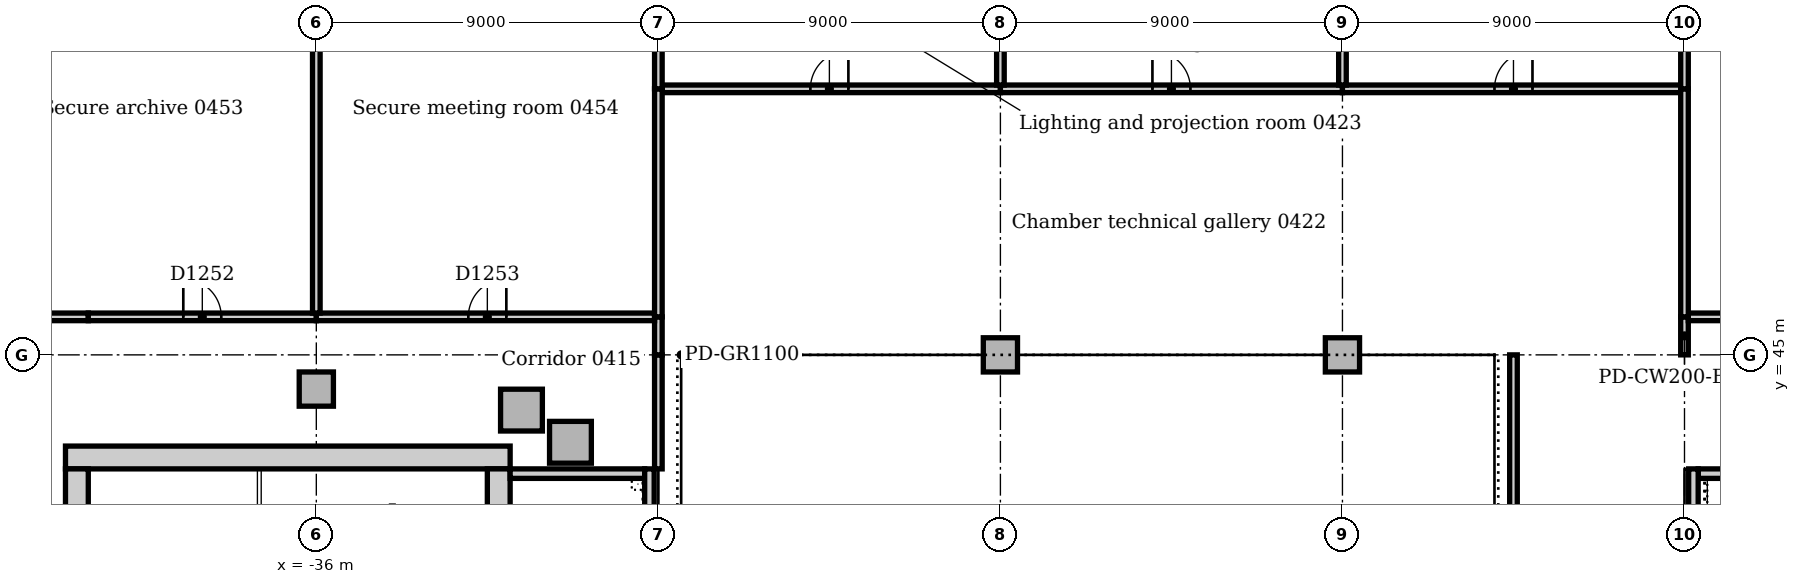
"""IFC4 building model, lengths in metres.
Left out: names, types, materials, properties, quantities, classifications, styles, units other than length and angle.
Written with IfcOpenShell. Run it as: python <this file> out.ifc"""

import sys

from ifc_helpers import new_model, si_unit, direction, frame, frame_2d, origin, origin_2d, place, context, subcontext, project, spatial, rectangle, extrude, element, fill, save


model = new_model("IFC4")
c1 = context("Model", 3, precision=1e-05, world=origin(), true_north=direction((0.0, 1.0)))
c2 = subcontext(c1, "Body", "Model", "MODEL_VIEW")
j1 = project(units=[si_unit("LENGTHUNIT", "METRE"), si_unit("PLANEANGLEUNIT", "RADIAN")], contexts=[c1])
p1 = place(None, origin())
s1 = spatial("IfcSite", under=j1, at=p1, CompositionType="ELEMENT")
p2 = place(p1, origin())
s2 = spatial("IfcBuilding", under=s1, at=p2, CompositionType="ELEMENT")
p3 = place(p2, frame((0.0, 0.0, 21.0)))
s3 = spatial("IfcBuildingStorey", under=s2, at=p3, CompositionType="ELEMENT", Elevation=21.0)
p4 = place(p3, frame((3.9, 41.875, 0.0), z_axis=(0.0, 0.0, 1.0), x_axis=(-1.0, 0.0, 0.0)))
e1 = element("IfcWall", 1, at=p4, inside=s3, PredefinedType="SOLIDWALL", context=c2, shape_type="SweptSolid", body=[
    extrude(rectangle(XDim=3.54, YDim=0.25, at=frame_2d((1.77, 0.0))), origin(), (0.0, 0.0, 1.0), 5.0),
])
p5 = place(p3, frame((0.235, 21.0, 0.0), z_axis=(0.0, 0.0, 1.0), x_axis=(0.0, 1.0, 0.0)))
e2 = element("IfcWall", 2, at=p5, inside=s3, PredefinedType="SOLIDWALL", context=c2, shape_type="SweptSolid", body=[
    extrude(rectangle(XDim=21.0, YDim=0.25, at=frame_2d((10.5, 0.0))), origin(), (0.0, 0.0, 1.0), 5.0),
])
p6 = place(p3, frame((-30.9, 42.3, 0.0), z_axis=(0.0, 0.0, 1.0), x_axis=(-1.0, 0.0, 0.0)))
e3 = element("IfcWall", 3, at=p6, inside=s3, PredefinedType="SOLIDWALL", context=c2, shape_type="SweptSolid", body=[
    extrude(rectangle(XDim=11.7, YDim=0.6, at=frame_2d((5.85, 0.0))), origin(), (0.0, 0.0, 1.0), 5.0),
])
p7 = place(p3, frame((-31.2, 30.5, 0.0), z_axis=(0.0, 0.0, 1.0), x_axis=(0.0, 1.0, 0.0)))
e4 = element("IfcWall", 4, at=p7, inside=s3, PredefinedType="SOLIDWALL", context=c2, shape_type="SweptSolid", body=[
    extrude(rectangle(XDim=11.5, YDim=0.6, at=frame_2d((5.75, 0.0))), origin(), (0.0, 0.0, 1.0), 5.0),
])
p8 = place(p7, frame((0.85, 0.0, 0.0)))
e5 = element("IfcOpeningElement", 5, at=p8, cuts=e4, PredefinedType="OPENING", context=c2, shape_type="SweptSolid", body=[
    extrude(rectangle(XDim=1.8, YDim=2.1, at=frame_2d((0.9, 1.05))), frame((0.0, 0.31, 0.0), z_axis=(0.0, -1.0, 0.0), x_axis=(1.0, 0.0, 0.0)), (0.0, 0.0, 1.0), 0.62),
])
p9 = place(p3, frame((-42.3, 42.0, 0.0), z_axis=(0.0, 0.0, 1.0), x_axis=(0.0, -1.0, 0.0)))
e6 = element("IfcWall", 6, at=p9, inside=s3, PredefinedType="SOLIDWALL", context=c2, shape_type="SweptSolid", body=[
    extrude(rectangle(XDim=11.5, YDim=0.6, at=frame_2d((5.75, 0.0))), origin(), (0.0, 0.0, 1.0), 5.0),
])
p10 = place(p9, frame((8.85, 0.0, 0.0)))
e7 = element("IfcOpeningElement", 7, at=p10, cuts=e6, PredefinedType="OPENING", context=c2, shape_type="SweptSolid", body=[
    extrude(rectangle(XDim=1.8, YDim=2.1, at=frame_2d((0.9, 1.05))), frame((0.0, 0.31, 0.0), z_axis=(0.0, -1.0, 0.0), x_axis=(1.0, 0.0, 0.0)), (0.0, 0.0, 1.0), 0.62),
])
p11 = place(p3, frame((-27.36, 41.875, 0.0), z_axis=(0.0, 0.0, 1.0), x_axis=(-1.0, 0.0, 0.0)))
e8 = element("IfcWall", 8, at=p11, inside=s3, PredefinedType="SOLIDWALL", context=c2, shape_type="SweptSolid", body=[
    extrude(rectangle(XDim=3.54, YDim=0.25, at=frame_2d((1.77, 0.0))), origin(), (0.0, 0.0, 1.0), 5.0),
])
p12 = place(p3, frame((-27.235, 35.35, 0.0), z_axis=(0.0, 0.0, 1.0), x_axis=(0.0, 1.0, 0.0)))
e9 = element("IfcWall", 9, at=p12, inside=s3, PredefinedType="SOLIDWALL", context=c2, shape_type="SweptSolid", body=[
    extrude(rectangle(XDim=6.65, YDim=0.25, at=frame_2d((3.325, 0.0))), origin(), (0.0, 0.0, 1.0), 5.0),
])
for number, where, z_axis, x_axis in (
    (10, (-29.313, 42.7, 0.0), (0.0, 0.0, 1.0), (1.0, 0.0, 0.0)),
    (11, (-30.602, 43.547, 0.0), (0.0, 0.0, 1.0), (1.0, 0.0, 0.0)),
):
    element("IfcColumn", number, at=place(p3, frame(where, z_axis=z_axis, x_axis=x_axis)), inside=s3, PredefinedType="COLUMN", context=c2, shape_type="SweptSolid", body=[
        extrude(rectangle(XDim=1.1, YDim=1.1, at=origin_2d()), origin(), (0.0, 0.0, 1.0), 4.85),
    ])
p13 = place(p3, frame((-36.0, 44.1, 0.0), z_axis=(0.0, 0.0, 1.0), x_axis=(1.0, 0.0, 0.0)))
e12 = element("IfcColumn", 12, at=p13, inside=s3, PredefinedType="COLUMN", context=c2, shape_type="SweptSolid", body=[
    extrude(rectangle(XDim=0.9, YDim=0.9, at=origin_2d()), origin(), (0.0, 0.0, 1.0), 4.85),
])
for number, where, z_axis, x_axis in (
    (13, (-18.0, 45.0, 0.0), (0.0, 0.0, 1.0), (1.0, 0.0, 0.0)),
    (14, (-9.0, 45.0, 0.0), (0.0, 0.0, 1.0), (1.0, 0.0, 0.0)),
):
    element("IfcColumn", number, at=place(p3, frame(where, z_axis=z_axis, x_axis=x_axis)), inside=s3, PredefinedType="COLUMN", context=c2, shape_type="SweptSolid", body=[
        extrude(rectangle(XDim=0.9, YDim=0.9, at=origin_2d()), origin(), (0.0, 0.0, 1.0), 4.7),
    ])
p14 = place(p3, frame((-44.9, 46.0, 0.0), z_axis=(0.0, 0.0, 1.0), x_axis=(1.0, 0.0, 0.0)))
e15 = element("IfcWall", 15, at=p14, inside=s3, PredefinedType="PARTITIONING", context=c2, shape_type="SweptSolid", body=[
    extrude(rectangle(XDim=2.9, YDim=0.2, at=frame_2d((1.45, 0.0))), origin(), (0.0, 0.0, 1.0), 4.7),
])
p15 = place(p3, frame((-27.0, 42.0, 0.0), z_axis=(0.0, 0.0, 1.0), x_axis=(0.0, 1.0, 0.0)))
e16 = element("IfcWall", 16, at=p15, inside=s3, PredefinedType="PARTITIONING", context=c2, shape_type="SweptSolid", body=[
    extrude(rectangle(XDim=3.0, YDim=0.2, at=frame_2d((1.5, 0.0))), origin(), (0.0, 0.0, 1.0), 4.7),
])
p16 = place(p3, frame((-27.0, 45.0, 0.0), z_axis=(0.0, 0.0, 1.0), x_axis=(0.0, 1.0, 0.0)))
e17 = element("IfcWall", 17, at=p16, inside=s3, PredefinedType="PARTITIONING", context=c2, shape_type="SweptSolid", body=[
    extrude(rectangle(XDim=1.0, YDim=0.2, at=frame_2d((0.5, 0.0))), origin(), (0.0, 0.0, 1.0), 4.7),
])
p17 = place(p3, frame((-42.0, 46.0, 0.0), z_axis=(0.0, 0.0, 1.0), x_axis=(1.0, 0.0, 0.0)))
e18 = element("IfcWall", 18, at=p17, inside=s3, PredefinedType="PARTITIONING", context=c2, shape_type="SweptSolid", body=[
    extrude(rectangle(XDim=6.0, YDim=0.2, at=frame_2d((3.0, 0.0))), origin(), (0.0, 0.0, 1.0), 4.7),
])
p18 = place(p17, frame((2.5, 0.0, 0.0)))
e19 = element("IfcOpeningElement", 19, at=p18, cuts=e18, PredefinedType="OPENING", context=c2, shape_type="SweptSolid", body=[
    extrude(rectangle(XDim=1.0, YDim=2.1, at=frame_2d((0.5, 1.05))), frame((0.0, 0.11, 0.0), z_axis=(0.0, -1.0, 0.0), x_axis=(1.0, 0.0, 0.0)), (0.0, 0.0, 1.0), 0.22),
])
p19 = place(p3, frame((-36.0, 46.0, 0.0), z_axis=(0.0, 0.0, 1.0), x_axis=(1.0, 0.0, 0.0)))
e20 = element("IfcWall", 20, at=p19, inside=s3, PredefinedType="PARTITIONING", context=c2, shape_type="SweptSolid", body=[
    extrude(rectangle(XDim=8.9, YDim=0.2, at=frame_2d((4.45, 0.0))), origin(), (0.0, 0.0, 1.0), 4.7),
])
p20 = place(p19, frame((4.0, 0.0, 0.0)))
e21 = element("IfcOpeningElement", 21, at=p20, cuts=e20, PredefinedType="OPENING", context=c2, shape_type="SweptSolid", body=[
    extrude(rectangle(XDim=1.0, YDim=2.1, at=frame_2d((0.5, 1.05))), frame((0.0, 0.11, 0.0), z_axis=(0.0, -1.0, 0.0), x_axis=(1.0, 0.0, 0.0)), (0.0, 0.0, 1.0), 0.22),
])
p21 = place(p3, frame((0.0, 45.0, 0.0), z_axis=(0.0, 0.0, 1.0), x_axis=(0.0, 1.0, 0.0)))
e22 = element("IfcWall", 22, at=p21, inside=s3, PredefinedType="PARTITIONING", context=c2, shape_type="SweptSolid", body=[
    extrude(rectangle(XDim=1.0, YDim=0.2, at=frame_2d((0.5, 0.0))), origin(), (0.0, 0.0, 1.0), 4.7),
])
p22 = place(p3, frame((0.1, 46.0, 0.0), z_axis=(0.0, 0.0, 1.0), x_axis=(1.0, 0.0, 0.0)))
e23 = element("IfcWall", 23, at=p22, inside=s3, PredefinedType="PARTITIONING", context=c2, shape_type="SweptSolid", body=[
    extrude(rectangle(XDim=8.9, YDim=0.2, at=frame_2d((4.45, 0.0))), origin(), (0.0, 0.0, 1.0), 4.7),
])
p23 = place(p22, frame((3.9, 0.0, 0.0)))
e24 = element("IfcOpeningElement", 24, at=p23, cuts=e23, PredefinedType="OPENING", context=c2, shape_type="SweptSolid", body=[
    extrude(rectangle(XDim=1.0, YDim=2.1, at=frame_2d((0.5, 1.05))), frame((0.0, 0.11, 0.0), z_axis=(0.0, -1.0, 0.0), x_axis=(1.0, 0.0, 0.0)), (0.0, 0.0, 1.0), 0.22),
])
p24 = place(p3, frame((-4.5, 21.0, 0.0), z_axis=(0.0, 0.0, 1.0), x_axis=(0.0, 1.0, 0.0)))
e25 = element("IfcWall", 25, at=p24, inside=s3, PredefinedType="PARTITIONING", context=c2, shape_type="SweptSolid", body=[
    extrude(rectangle(XDim=24.0, YDim=0.2, at=frame_2d((12.0, 0.0))), origin(), (0.0, 0.0, 1.0), 4.7),
])
p25 = place(p3, frame((-26.9, 52.0, 0.0), z_axis=(0.0, 0.0, 1.0), x_axis=(1.0, 0.0, 0.0)))
e26 = element("IfcWall", 26, at=p25, inside=s3, PredefinedType="PARTITIONING", context=c2, shape_type="SweptSolid", body=[
    extrude(rectangle(XDim=8.9, YDim=0.2, at=frame_2d((4.45, 0.0))), origin(), (0.0, 0.0, 1.0), 4.7),
])
p26 = place(p25, frame((3.9, 0.0, 0.0)))
e27 = element("IfcOpeningElement", 27, at=p26, cuts=e26, PredefinedType="OPENING", context=c2, shape_type="SweptSolid", body=[
    extrude(rectangle(XDim=1.0, YDim=2.1, at=frame_2d((0.5, 1.05))), frame((0.0, 0.11, 0.0), z_axis=(0.0, -1.0, 0.0), x_axis=(1.0, 0.0, 0.0)), (0.0, 0.0, 1.0), 0.22),
])
p27 = place(p3, frame((-18.0, 52.0, 0.0), z_axis=(0.0, 0.0, 1.0), x_axis=(1.0, 0.0, 0.0)))
e28 = element("IfcWall", 28, at=p27, inside=s3, PredefinedType="PARTITIONING", context=c2, shape_type="SweptSolid", body=[
    extrude(rectangle(XDim=9.0, YDim=0.2, at=frame_2d((4.5, 0.0))), origin(), (0.0, 0.0, 1.0), 4.7),
])
p28 = place(p27, frame((4.0, 0.0, 0.0)))
e29 = element("IfcOpeningElement", 29, at=p28, cuts=e28, PredefinedType="OPENING", context=c2, shape_type="SweptSolid", body=[
    extrude(rectangle(XDim=1.0, YDim=2.1, at=frame_2d((0.5, 1.05))), frame((0.0, 0.11, 0.0), z_axis=(0.0, -1.0, 0.0), x_axis=(1.0, 0.0, 0.0)), (0.0, 0.0, 1.0), 0.22),
])
p29 = place(p3, frame((-9.0, 52.0, 0.0), z_axis=(0.0, 0.0, 1.0), x_axis=(1.0, 0.0, 0.0)))
e30 = element("IfcWall", 30, at=p29, inside=s3, PredefinedType="PARTITIONING", context=c2, shape_type="SweptSolid", body=[
    extrude(rectangle(XDim=8.9, YDim=0.2, at=frame_2d((4.45, 0.0))), origin(), (0.0, 0.0, 1.0), 4.7),
])
p30 = place(p29, frame((4.0, 0.0, 0.0)))
e31 = element("IfcOpeningElement", 31, at=p30, cuts=e30, PredefinedType="OPENING", context=c2, shape_type="SweptSolid", body=[
    extrude(rectangle(XDim=1.0, YDim=2.1, at=frame_2d((0.5, 1.05))), frame((0.0, 0.11, 0.0), z_axis=(0.0, -1.0, 0.0), x_axis=(1.0, 0.0, 0.0)), (0.0, 0.0, 1.0), 0.22),
])
for number, where, z_axis, x_axis in (
    (32, (-27.0, 46.0, 0.0), (0.0, 0.0, 1.0), (0.0, 1.0, 0.0)),
    (33, (0.0, 46.0, 0.0), (0.0, 0.0, 1.0), (0.0, 1.0, 0.0)),
):
    element("IfcWall", number, at=place(p3, frame(where, z_axis=z_axis, x_axis=x_axis)), inside=s3, PredefinedType="PARTITIONING", context=c2, shape_type="SweptSolid", body=[
        extrude(rectangle(XDim=6.0, YDim=0.2, at=frame_2d((3.0, 0.0))), origin(), (0.0, 0.0, 1.0), 4.7),
    ])
p31 = place(p3, frame((-18.0, 52.1, 0.0), z_axis=(0.0, 0.0, 1.0), x_axis=(0.0, 1.0, 0.0)))
e34 = element("IfcWall", 34, at=p31, inside=s3, PredefinedType="PARTITIONING", context=c2, shape_type="SweptSolid", body=[
    extrude(rectangle(XDim=1.43, YDim=0.2, at=frame_2d((0.715, 0.0))), origin(), (0.0, 0.0, 1.0), 4.7),
])
p32 = place(p3, frame((-27.0, 52.0, 0.0), z_axis=(0.0, 0.0, 1.0), x_axis=(0.0, 1.0, 0.0)))
e35 = element("IfcWall", 35, at=p32, inside=s3, PredefinedType="PARTITIONING", context=c2, shape_type="SweptSolid", body=[
    extrude(rectangle(XDim=1.53, YDim=0.2, at=frame_2d((0.765, 0.0))), origin(), (0.0, 0.0, 1.0), 4.7),
])
p33 = place(p3, frame((-9.0, 52.1, 0.0), z_axis=(0.0, 0.0, 1.0), x_axis=(0.0, 1.0, 0.0)))
e36 = element("IfcWall", 36, at=p33, inside=s3, PredefinedType="PARTITIONING", context=c2, shape_type="SweptSolid", body=[
    extrude(rectangle(XDim=1.43, YDim=0.2, at=frame_2d((0.715, 0.0))), origin(), (0.0, 0.0, 1.0), 4.7),
])
p34 = place(p3, frame((0.0, 52.0, 0.0), z_axis=(0.0, 0.0, 1.0), x_axis=(0.0, 1.0, 0.0)))
e37 = element("IfcWall", 37, at=p34, inside=s3, PredefinedType="PARTITIONING", context=c2, shape_type="SweptSolid", body=[
    extrude(rectangle(XDim=1.53, YDim=0.2, at=frame_2d((0.765, 0.0))), origin(), (0.0, 0.0, 1.0), 4.7),
])
p35 = place(p3, frame((-36.0, 46.1, 0.0), z_axis=(0.0, 0.0, 1.0), x_axis=(0.0, 1.0, 0.0)))
e38 = element("IfcWall", 38, at=p35, inside=s3, PredefinedType="PARTITIONING", context=c2, shape_type="SweptSolid", body=[
    extrude(rectangle(XDim=7.43, YDim=0.2, at=frame_2d((3.715, 0.0))), origin(), (0.0, 0.0, 1.0), 4.7),
])
p36 = place(p3, frame((0.48, 39.795, 0.0), z_axis=(0.0, 0.0, 1.0), x_axis=(0.0, 1.0, 0.0)))
e39 = element("IfcWall", 39, at=p36, inside=s3, PredefinedType="STANDARD", context=c2, shape_type="SweptSolid", body=[
    extrude(rectangle(XDim=1.955, YDim=0.24, at=frame_2d((0.978, 0.0))), origin(), (0.0, 0.0, 1.0), 5.0),
])
p37 = place(p3, frame((-34.0, 41.075, 0.0), z_axis=(0.0, 0.0, 1.0), x_axis=(0.0, -1.0, 0.0)))
e40 = element("IfcWall", 40, at=p37, inside=s3, PredefinedType="SOLIDWALL", context=c2, shape_type="SweptSolid", body=[
    extrude(rectangle(XDim=7.0, YDim=0.15, at=frame_2d((3.5, 0.0))), origin(), (0.0, 0.0, 1.0), 5.0),
])
p38 = place(p3, frame((-37.5, 34.075, 0.0), z_axis=(0.0, 0.0, 1.0), x_axis=(0.0, 1.0, 0.0)))
e41 = element("IfcWall", 41, at=p38, inside=s3, PredefinedType="PARTITIONING", context=c2, shape_type="SweptSolid", body=[
    extrude(rectangle(XDim=7.925, YDim=0.1, at=frame_2d((3.962, 0.0))), origin(), (0.0, 0.0, 1.0), 4.85),
])
p39 = place(p26, origin())
e42 = element("IfcDoor", 42, at=p39, inside=s3, OperationType="SINGLE_SWING_RIGHT", PredefinedType="DOOR", context=c2, shape_type="SweptSolid", body=[
    extrude(rectangle(XDim=1.0, YDim=2.1, at=frame_2d((0.5, 1.05))), frame((0.0, 0.025, 0.0), z_axis=(0.0, -1.0, 0.0), x_axis=(1.0, 0.0, 0.0)), (0.0, 0.0, 1.0), 0.05),
])
fill(e27, e42)
p40 = place(p28, origin())
e43 = element("IfcDoor", 43, at=p40, inside=s3, OperationType="SINGLE_SWING_LEFT", PredefinedType="DOOR", context=c2, shape_type="SweptSolid", body=[
    extrude(rectangle(XDim=1.0, YDim=2.1, at=frame_2d((0.5, 1.05))), frame((0.0, 0.025, 0.0), z_axis=(0.0, -1.0, 0.0), x_axis=(1.0, 0.0, 0.0)), (0.0, 0.0, 1.0), 0.05),
])
fill(e29, e43)
p41 = place(p30, origin())
e44 = element("IfcDoor", 44, at=p41, inside=s3, OperationType="SINGLE_SWING_RIGHT", PredefinedType="DOOR", context=c2, shape_type="SweptSolid", body=[
    extrude(rectangle(XDim=1.0, YDim=2.1, at=frame_2d((0.5, 1.05))), frame((0.0, 0.025, 0.0), z_axis=(0.0, -1.0, 0.0), x_axis=(1.0, 0.0, 0.0)), (0.0, 0.0, 1.0), 0.05),
])
fill(e31, e44)
p42 = place(p18, origin())
e45 = element("IfcDoor", 45, at=p42, inside=s3, OperationType="SINGLE_SWING_LEFT", PredefinedType="DOOR", context=c2, shape_type="SweptSolid", body=[
    extrude(rectangle(XDim=1.0, YDim=2.1, at=frame_2d((0.5, 1.05))), frame((0.0, 0.025, 0.0), z_axis=(0.0, -1.0, 0.0), x_axis=(1.0, 0.0, 0.0)), (0.0, 0.0, 1.0), 0.05),
])
fill(e19, e45)
p43 = place(p20, origin())
e46 = element("IfcDoor", 46, at=p43, inside=s3, OperationType="SINGLE_SWING_RIGHT", PredefinedType="DOOR", context=c2, shape_type="SweptSolid", body=[
    extrude(rectangle(XDim=1.0, YDim=2.1, at=frame_2d((0.5, 1.05))), frame((0.0, 0.025, 0.0), z_axis=(0.0, -1.0, 0.0), x_axis=(1.0, 0.0, 0.0)), (0.0, 0.0, 1.0), 0.05),
])
fill(e21, e46)
save(model, sys.argv[1])
